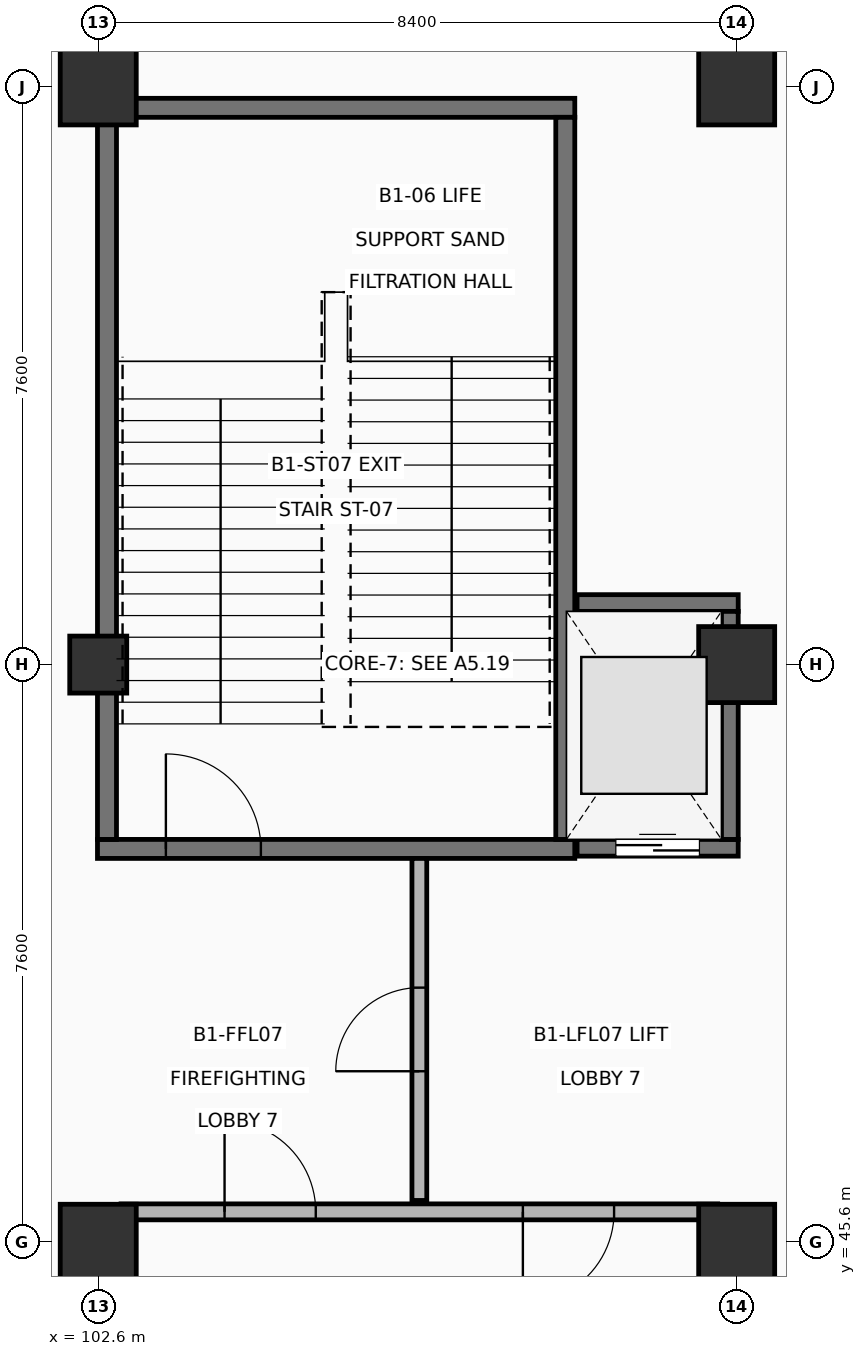
"""IFC4 building model, lengths in metres.
Left out: names, types, materials, properties, quantities, classifications, styles, units other than length and angle.
Written with IfcOpenShell. Run it as: python <this file> out.ifc"""

import sys

from ifc_helpers import new_model, si_unit, direction, frame, frame_2d, origin, origin_2d, place, context, subcontext, project, spatial, rectangle, circle, extrude, element, fill, save


model = new_model("IFC4")
c1 = context("Model", 3, precision=1e-05, world=origin(), true_north=direction((0.0, 1.0)))
c2 = subcontext(c1, "Body", "Model", "MODEL_VIEW")
j1 = project(units=[si_unit("LENGTHUNIT", "METRE"), si_unit("PLANEANGLEUNIT", "RADIAN")], contexts=[c1])
p1 = place(None, origin())
s1 = spatial("IfcSite", under=j1, at=p1, CompositionType="ELEMENT")
p2 = place(p1, origin())
s2 = spatial("IfcBuilding", under=s1, at=p2, CompositionType="ELEMENT")
p3 = place(p2, frame((0.0, 0.0, -5.4)))
s3 = spatial("IfcBuildingStorey", under=s2, at=p3, CompositionType="ELEMENT", Elevation=-5.4)
p4 = place(p3, frame((102.6, 45.6, 0.0), z_axis=(0.0, 0.0, 1.0), x_axis=(1.0, 0.0, 0.0)))
e1 = element("IfcColumn", 1, at=p4, inside=s3, PredefinedType="COLUMN", context=c2, shape_type="SweptSolid", body=[
    extrude(rectangle(XDim=1.0, YDim=1.0, at=origin_2d()), origin(), (0.0, 0.0, 1.0), 5.4),
])
p5 = place(p3, frame((102.6, 53.2, 0.0), z_axis=(0.0, 0.0, 1.0), x_axis=(1.0, 0.0, 0.0)))
e2 = element("IfcColumn", 2, at=p5, inside=s3, PredefinedType="COLUMN", context=c2, shape_type="SweptSolid", body=[
    extrude(circle(Radius=0.375, at=origin_2d()), origin(), (0.0, 0.0, 1.0), 5.4),
])
for number, where, z_axis, x_axis in (
    (3, (102.6, 60.8, 0.0), (0.0, 0.0, 1.0), (1.0, 0.0, 0.0)),
    (4, (111.0, 45.6, 0.0), (0.0, 0.0, 1.0), (1.0, 0.0, 0.0)),
    (5, (111.0, 53.2, 0.0), (0.0, 0.0, 1.0), (1.0, 0.0, 0.0)),
    (6, (111.0, 60.8, 0.0), (0.0, 0.0, 1.0), (1.0, 0.0, 0.0)),
):
    element("IfcColumn", number, at=place(p3, frame(where, z_axis=z_axis, x_axis=x_axis)), inside=s3, PredefinedType="COLUMN", context=c2, shape_type="SweptSolid", body=[
        extrude(rectangle(XDim=1.0, YDim=1.0, at=origin_2d()), origin(), (0.0, 0.0, 1.0), 5.4),
    ])
p6 = place(p3, frame((102.59, 50.775, 0.0), z_axis=(0.0, 0.0, 1.0), x_axis=(1.0, 0.0, 0.0)))
e7 = element("IfcWall", 7, at=p6, inside=s3, PredefinedType="SHEAR", context=c2, shape_type="SweptSolid", body=[
    extrude(rectangle(XDim=6.28, YDim=0.25, at=frame_2d((3.14, 0.0))), origin(), (0.0, 0.0, 1.0), 5.14),
])
p7 = place(p6, frame((0.9, 0.0, 0.0)))
e8 = element("IfcOpeningElement", 8, at=p7, cuts=e7, PredefinedType="OPENING", context=c2, shape_type="SweptSolid", body=[
    extrude(rectangle(XDim=1.25, YDim=2.2, at=frame_2d((0.625, 1.1))), frame((0.0, 0.135, 0.0), z_axis=(0.0, -1.0, 0.0), x_axis=(1.0, 0.0, 0.0)), (0.0, 0.0, 1.0), 0.27),
])
p8 = place(p3, frame((102.59, 60.525, 0.0), z_axis=(0.0, 0.0, 1.0), x_axis=(1.0, 0.0, 0.0)))
e9 = element("IfcWall", 9, at=p8, inside=s3, PredefinedType="SHEAR", context=c2, shape_type="SweptSolid", body=[
    extrude(rectangle(XDim=6.28, YDim=0.25, at=frame_2d((3.14, 0.0))), origin(), (0.0, 0.0, 1.0), 5.14),
])
for number, where, z_axis, x_axis in (
    (10, (102.715, 50.9, 0.0), (0.0, 0.0, 1.0), (0.0, 1.0, 0.0)),
    (11, (108.745, 50.9, 0.0), (0.0, 0.0, 1.0), (0.0, 1.0, 0.0)),
):
    element("IfcWall", number, at=place(p3, frame(where, z_axis=z_axis, x_axis=x_axis)), inside=s3, PredefinedType="SHEAR", context=c2, shape_type="SweptSolid", body=[
        extrude(rectangle(XDim=9.5, YDim=0.25, at=frame_2d((4.75, 0.0))), origin(), (0.0, 0.0, 1.0), 5.14),
    ])
p9 = place(p3, frame((108.9, 50.79, 0.0), z_axis=(0.0, 0.0, 1.0), x_axis=(1.0, 0.0, 0.0)))
e12 = element("IfcWall", 12, at=p9, inside=s3, PredefinedType="SHEAR", context=c2, shape_type="SweptSolid", body=[
    extrude(rectangle(XDim=2.12, YDim=0.22, at=frame_2d((1.06, 0.0))), origin(), (0.0, 0.0, 1.0), 5.14),
])
p10 = place(p9, frame((0.51, 0.0, 0.0)))
e13 = element("IfcOpeningElement", 13, at=p10, cuts=e12, PredefinedType="OPENING", context=c2, shape_type="SweptSolid", body=[
    extrude(rectangle(XDim=1.1, YDim=2.15, at=frame_2d((0.55, 1.075))), frame((0.0, 0.12, 0.0), z_axis=(0.0, -1.0, 0.0), x_axis=(1.0, 0.0, 0.0)), (0.0, 0.0, 1.0), 0.24),
])
p11 = place(p3, frame((108.9, 54.01, 0.0), z_axis=(0.0, 0.0, 1.0), x_axis=(1.0, 0.0, 0.0)))
e14 = element("IfcWall", 14, at=p11, inside=s3, PredefinedType="SHEAR", context=c2, shape_type="SweptSolid", body=[
    extrude(rectangle(XDim=2.12, YDim=0.22, at=frame_2d((1.06, 0.0))), origin(), (0.0, 0.0, 1.0), 5.14),
])
p12 = place(p3, frame((110.91, 50.9, 0.0), z_axis=(0.0, 0.0, 1.0), x_axis=(0.0, 1.0, 0.0)))
e15 = element("IfcWall", 15, at=p12, inside=s3, PredefinedType="SHEAR", context=c2, shape_type="SweptSolid", body=[
    extrude(rectangle(XDim=3.0, YDim=0.22, at=frame_2d((1.5, 0.0))), origin(), (0.0, 0.0, 1.0), 5.14),
])
p13 = place(p3, frame((102.9, 46.0, 0.0), z_axis=(0.0, 0.0, 1.0), x_axis=(1.0, 0.0, 0.0)))
e16 = element("IfcWall", 16, at=p13, inside=s3, PredefinedType="PARTITIONING", context=c2, shape_type="SweptSolid", body=[
    extrude(rectangle(XDim=7.85, YDim=0.21, at=frame_2d((3.925, 0.0))), origin(), (0.0, 0.0, 1.0), 4.135),
])
p14 = place(p13, frame((1.362, 0.0, 0.0)))
e17 = element("IfcOpeningElement", 17, at=p14, cuts=e16, PredefinedType="OPENING", context=c2, shape_type="SweptSolid", body=[
    extrude(rectangle(XDim=1.2, YDim=2.2, at=frame_2d((0.6, 1.1))), frame((0.0, 0.115, 0.0), z_axis=(0.0, -1.0, 0.0), x_axis=(1.0, 0.0, 0.0)), (0.0, 0.0, 1.0), 0.23),
])
p15 = place(p13, frame((5.287, 0.0, 0.0)))
e18 = element("IfcOpeningElement", 18, at=p15, cuts=e16, PredefinedType="OPENING", context=c2, shape_type="SweptSolid", body=[
    extrude(rectangle(XDim=1.2, YDim=2.2, at=frame_2d((0.6, 1.1))), frame((0.0, 0.115, 0.0), z_axis=(0.0, -1.0, 0.0), x_axis=(1.0, 0.0, 0.0)), (0.0, 0.0, 1.0), 0.23),
])
p16 = place(p3, frame((106.825, 46.15, 0.0), z_axis=(0.0, 0.0, 1.0), x_axis=(0.0, 1.0, 0.0)))
e19 = element("IfcWall", 19, at=p16, inside=s3, PredefinedType="PARTITIONING", context=c2, shape_type="SweptSolid", body=[
    extrude(rectangle(XDim=4.5, YDim=0.195, at=frame_2d((2.25, 0.0))), origin(), (0.0, 0.0, 1.0), 5.14),
])
p17 = place(p16, frame((1.7, 0.0, 0.0)))
e20 = element("IfcOpeningElement", 20, at=p17, cuts=e19, PredefinedType="OPENING", context=c2, shape_type="SweptSolid", body=[
    extrude(rectangle(XDim=1.1, YDim=2.15, at=frame_2d((0.55, 1.075))), frame((0.0, 0.107, 0.0), z_axis=(0.0, -1.0, 0.0), x_axis=(1.0, 0.0, 0.0)), (0.0, 0.0, 1.0), 0.215),
])
p18 = place(p7, origin())
e21 = element("IfcDoor", 21, at=p18, inside=s3, OperationType="SINGLE_SWING_LEFT", PredefinedType="DOOR", context=c2, shape_type="SweptSolid", body=[
    extrude(rectangle(XDim=1.25, YDim=2.2, at=frame_2d((0.625, 1.1))), frame((0.0, 0.025, 0.0), z_axis=(0.0, -1.0, 0.0), x_axis=(1.0, 0.0, 0.0)), (0.0, 0.0, 1.0), 0.05),
])
fill(e8, e21)
p19 = place(p10, origin())
e22 = element("IfcDoor", 22, at=p19, inside=s3, OperationType="DOUBLE_DOOR_SLIDING", PredefinedType="DOOR", context=c2, shape_type="SweptSolid", body=[
    extrude(rectangle(XDim=1.1, YDim=2.15, at=frame_2d((0.55, 1.075))), frame((0.0, 0.025, 0.0), z_axis=(0.0, -1.0, 0.0), x_axis=(1.0, 0.0, 0.0)), (0.0, 0.0, 1.0), 0.05),
])
fill(e13, e22)
p20 = place(p14, origin())
e23 = element("IfcDoor", 23, at=p20, inside=s3, OperationType="SINGLE_SWING_LEFT", PredefinedType="DOOR", context=c2, shape_type="SweptSolid", body=[
    extrude(rectangle(XDim=1.2, YDim=2.2, at=frame_2d((0.6, 1.1))), frame((0.0, 0.025, 0.0), z_axis=(0.0, -1.0, 0.0), x_axis=(1.0, 0.0, 0.0)), (0.0, 0.0, 1.0), 0.05),
])
fill(e17, e23)
p21 = place(p15, origin())
e24 = element("IfcDoor", 24, at=p21, inside=s3, OperationType="SINGLE_SWING_RIGHT", PredefinedType="DOOR", context=c2, shape_type="SweptSolid", body=[
    extrude(rectangle(XDim=1.2, YDim=2.2, at=frame_2d((0.6, 1.1))), frame((0.0, 0.025, 0.0), z_axis=(0.0, -1.0, 0.0), x_axis=(1.0, 0.0, 0.0)), (0.0, 0.0, 1.0), 0.05),
])
fill(e18, e24)
p22 = place(p17, origin())
e25 = element("IfcDoor", 25, at=p22, inside=s3, OperationType="SINGLE_SWING_LEFT", PredefinedType="DOOR", context=c2, shape_type="SweptSolid", body=[
    extrude(rectangle(XDim=1.1, YDim=2.15, at=frame_2d((0.55, 1.075))), frame((0.0, 0.025, 0.0), z_axis=(0.0, -1.0, 0.0), x_axis=(1.0, 0.0, 0.0)), (0.0, 0.0, 1.0), 0.05),
])
fill(e20, e25)
save(model, sys.argv[1])
